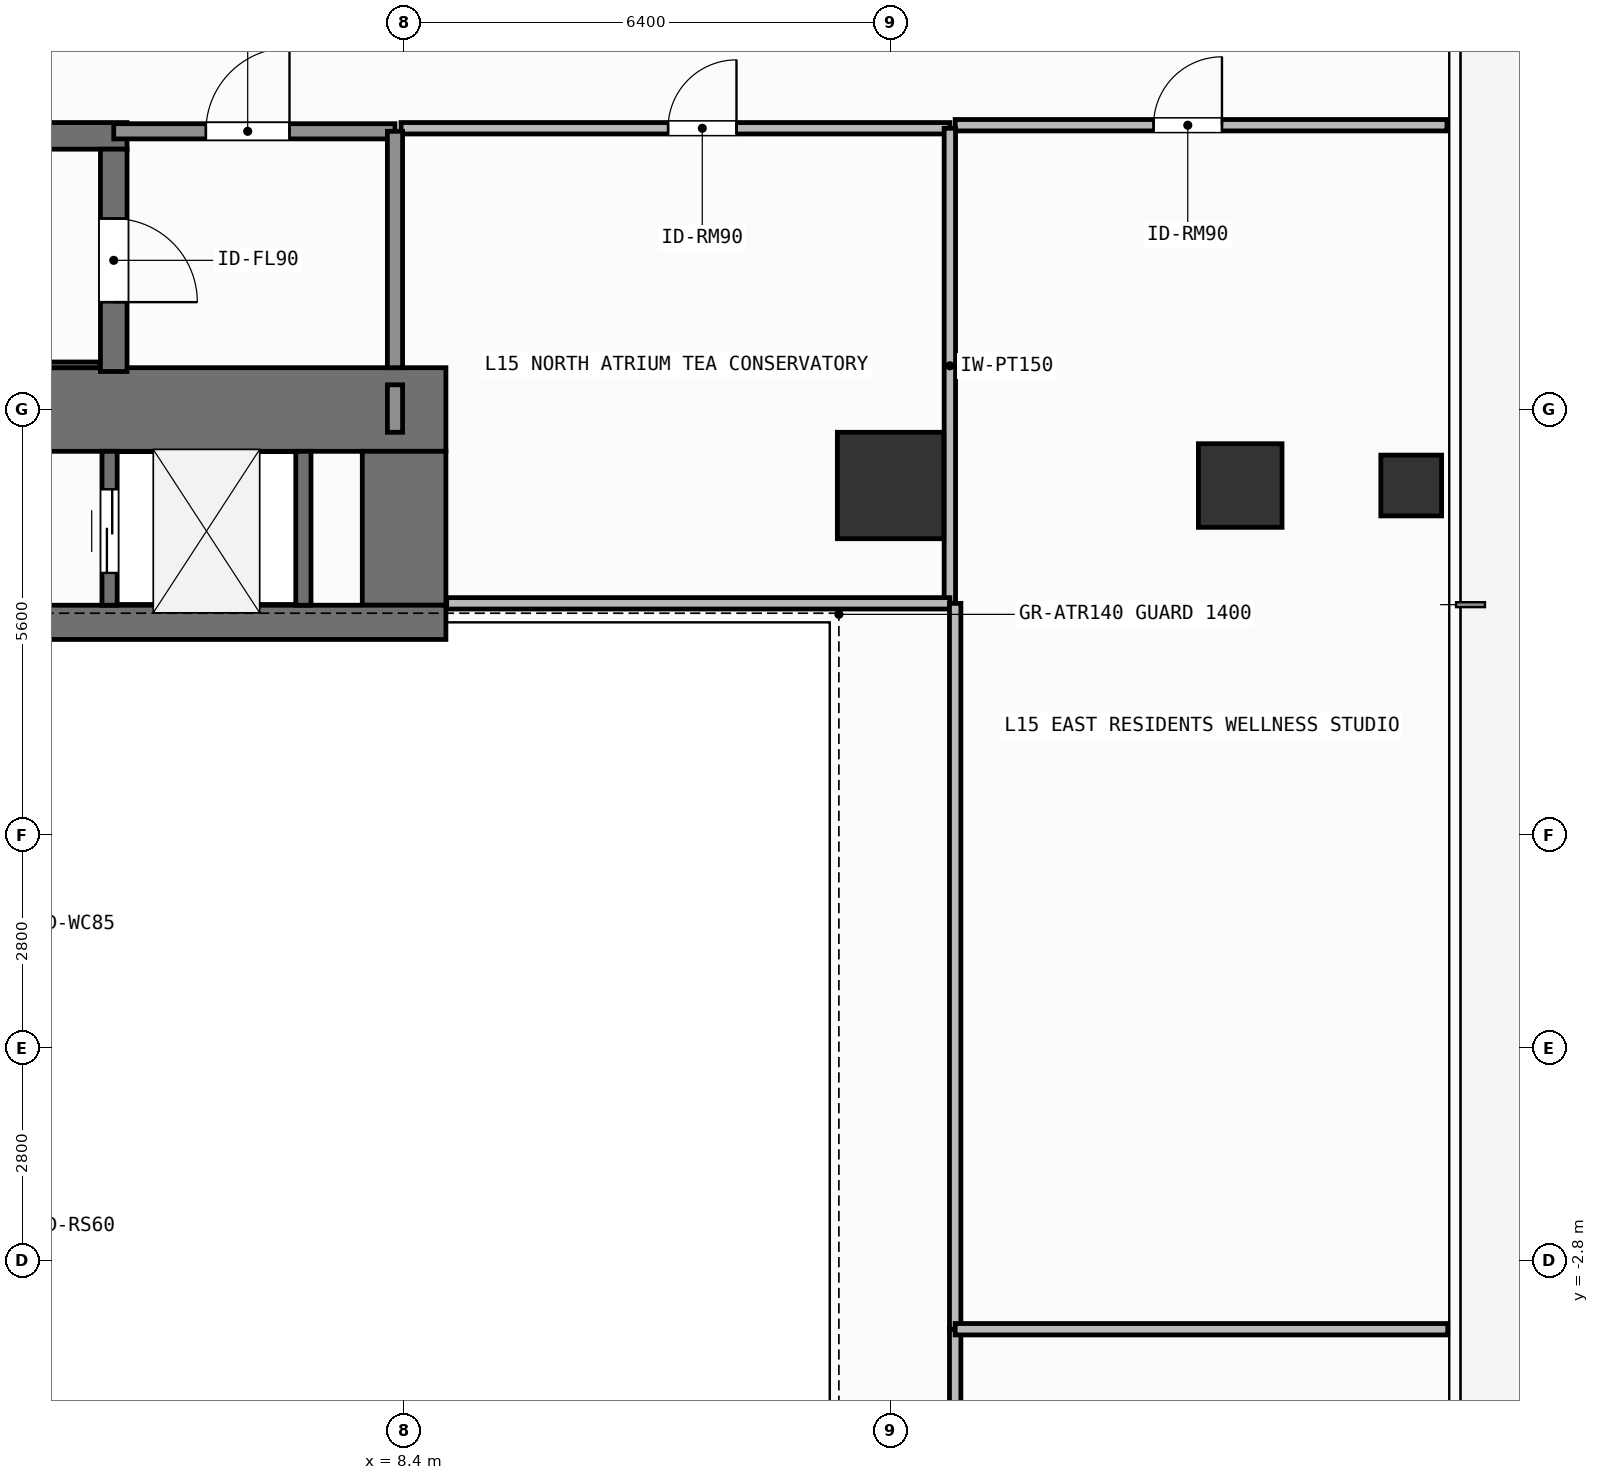
"""IFC4 building model, lengths in metres.
Left out: names, types, materials, properties, quantities, classifications, styles, units other than length and angle.
Written with IfcOpenShell. Run it as: python <this file> out.ifc"""

import sys

from ifc_helpers import new_model, si_unit, direction, frame, frame_2d, origin, origin_2d, place, context, subcontext, project, spatial, rectangle, hollow_rectangle, extrude, element, fill, save


model = new_model("IFC4")
c1 = context("Model", 3, precision=1e-05, world=origin(), true_north=direction((0.0, 1.0)))
c2 = subcontext(c1, "Body", "Model", "MODEL_VIEW")
j1 = project(units=[si_unit("LENGTHUNIT", "METRE"), si_unit("PLANEANGLEUNIT", "RADIAN")], contexts=[c1])
p1 = place(None, origin())
s1 = spatial("IfcSite", under=j1, at=p1, CompositionType="ELEMENT")
p2 = place(p1, origin())
s2 = spatial("IfcBuilding", under=s1, at=p2, CompositionType="ELEMENT")
p3 = place(p2, frame((0.0, 0.0, 57.9)))
s3 = spatial("IfcBuildingStorey", under=s2, at=p3, CompositionType="ELEMENT", Elevation=57.9)
p4 = place(p3, frame((-7.55, 8.4, 0.0), z_axis=(0.0, 0.0, 1.0), x_axis=(1.0, 0.0, 0.0)))
e1 = element("IfcWall", 1, at=p4, inside=s3, PredefinedType="SHEAR", context=c2, shape_type="SweptSolid", body=[
    extrude(rectangle(XDim=16.5, YDim=1.1, at=frame_2d((8.25, 0.0))), origin(), (0.0, 0.0, 1.0), 3.9),
])
p5 = place(p3, frame((8.4, 5.825, 0.0), z_axis=(0.0, 0.0, 1.0), x_axis=(0.0, 1.0, 0.0)))
e2 = element("IfcWall", 2, at=p5, inside=s3, PredefinedType="SHEAR", context=c2, shape_type="SweptSolid", body=[
    extrude(rectangle(XDim=2.025, YDim=1.1, at=frame_2d((1.013, 0.0))), origin(), (0.0, 0.0, 1.0), 3.9),
])
p6 = place(p3, frame((3.045, 5.6, 0.0), z_axis=(0.0, 0.0, 1.0), x_axis=(1.0, 0.0, 0.0)))
e3 = element("IfcWall", 3, at=p6, inside=s3, PredefinedType="SHEAR", context=c2, shape_type="SweptSolid", body=[
    extrude(rectangle(XDim=5.905, YDim=0.45, at=frame_2d((2.953, 0.0))), origin(), (0.0, 0.0, 1.0), 3.9),
])
p7 = place(p3, frame((-2.555, 12.0, 0.0), z_axis=(0.0, 0.0, 1.0), x_axis=(1.0, 0.0, 0.0)))
e4 = element("IfcWall", 4, at=p7, inside=s3, PredefinedType="SHEAR", context=c2, shape_type="SweptSolid", body=[
    extrude(rectangle(XDim=7.31, YDim=0.35, at=frame_2d((3.655, 0.0))), origin(), (0.0, 0.0, 1.0), 3.9),
])
p8 = place(p3, frame((-2.2, 8.988, 0.0), z_axis=(0.0, 0.0, 1.0), x_axis=(1.0, 0.0, 0.0)))
e5 = element("IfcWall", 5, at=p8, inside=s3, PredefinedType="SHEAR", context=c2, shape_type="SweptSolid", body=[
    extrude(rectangle(XDim=6.6, YDim=0.075, at=frame_2d((3.3, 0.0))), origin(), (0.0, 0.0, 1.0), 3.9),
])
p9 = place(p3, frame((4.58, 11.825, 0.0), z_axis=(0.0, 0.0, 1.0), x_axis=(0.0, -1.0, 0.0)))
e6 = element("IfcWall", 6, at=p9, inside=s3, PredefinedType="SHEAR", context=c2, shape_type="SweptSolid", body=[
    extrude(rectangle(XDim=2.925, YDim=0.35, at=frame_2d((1.462, 0.0))), origin(), (0.0, 0.0, 1.0), 3.9),
])
p10 = place(p9, frame((0.913, 0.0, 0.0)))
e7 = element("IfcOpeningElement", 7, at=p10, cuts=e6, PredefinedType="OPENING", context=c2, shape_type="SweptSolid", body=[
    extrude(rectangle(XDim=1.1, YDim=2.15, at=frame_2d((0.55, 1.075))), frame((0.0, 0.185, 0.0), z_axis=(0.0, -1.0, 0.0), x_axis=(1.0, 0.0, 0.0)), (0.0, 0.0, 1.0), 0.37),
])
p11 = place(p3, frame((14.8, 7.4, 0.0), z_axis=(0.0, 0.0, 1.0), x_axis=(1.0, 0.0, 0.0)))
e8 = element("IfcColumn", 8, at=p11, inside=s3, PredefinedType="COLUMN", context=c2, shape_type="SweptSolid", body=[
    extrude(rectangle(XDim=1.4, YDim=1.4, at=origin_2d()), origin(), (0.0, 0.0, 1.0), 3.9),
])
p12 = place(p3, frame((19.4, 7.4, 0.0), z_axis=(0.0, 0.0, 1.0), x_axis=(1.0, 0.0, 0.0)))
e9 = element("IfcColumn", 9, at=p12, inside=s3, PredefinedType="COLUMN", context=c2, shape_type="SweptSolid", body=[
    extrude(rectangle(XDim=1.1, YDim=1.1, at=origin_2d()), origin(), (0.0, 0.0, 1.0), 3.9),
])
p13 = place(p3, frame((21.65, 7.4, 0.0), z_axis=(0.0, 0.0, 1.0), x_axis=(1.0, 0.0, 0.0)))
e10 = element("IfcColumn", 10, at=p13, inside=s3, PredefinedType="COLUMN", context=c2, shape_type="SweptSolid", body=[
    extrude(hollow_rectangle(XDim=0.8, YDim=0.8, WallThickness=0.036, at=origin_2d()), origin(), (0.0, 0.0, 1.0), 3.9),
])
p14 = place(p3, frame((4.525, 5.825, 0.0), z_axis=(0.0, 0.0, 1.0), x_axis=(0.0, 1.0, 0.0)))
e11 = element("IfcWall", 11, at=p14, inside=s3, PredefinedType="SHEAR", context=c2, shape_type="SweptSolid", body=[
    extrude(rectangle(XDim=2.025, YDim=0.2, at=frame_2d((1.013, 0.0))), origin(), (0.0, 0.0, 1.0), 3.68),
])
p15 = place(p14, frame((0.425, 0.0, 0.0)))
e12 = element("IfcOpeningElement", 12, at=p15, cuts=e11, PredefinedType="OPENING", context=c2, shape_type="SweptSolid", body=[
    extrude(rectangle(XDim=1.1, YDim=2.2, at=frame_2d((0.55, 1.1))), frame((0.0, 0.11, 0.0), z_axis=(0.0, -1.0, 0.0), x_axis=(1.0, 0.0, 0.0)), (0.0, 0.0, 1.0), 0.22),
])
p16 = place(p3, frame((7.075, 5.825, 0.0), z_axis=(0.0, 0.0, 1.0), x_axis=(0.0, 1.0, 0.0)))
e13 = element("IfcWall", 13, at=p16, inside=s3, PredefinedType="SHEAR", context=c2, shape_type="SweptSolid", body=[
    extrude(rectangle(XDim=2.025, YDim=0.2, at=frame_2d((1.013, 0.0))), origin(), (0.0, 0.0, 1.0), 3.68),
])
p17 = place(p3, frame((4.58, 12.06, 0.0), z_axis=(0.0, 0.0, 1.0), x_axis=(1.0, 0.0, 0.0)))
e14 = element("IfcWall", 14, at=p17, inside=s3, PredefinedType="SOLIDWALL", context=c2, shape_type="SweptSolid", body=[
    extrude(rectangle(XDim=3.7, YDim=0.2, at=frame_2d((1.85, 0.0))), origin(), (0.0, 0.0, 1.0), 3.68),
])
p18 = place(p17, frame((1.212, 0.0, 0.0)))
e15 = element("IfcOpeningElement", 15, at=p18, cuts=e14, PredefinedType="OPENING", context=c2, shape_type="SweptSolid", body=[
    extrude(rectangle(XDim=1.1, YDim=2.15, at=frame_2d((0.55, 1.075))), frame((0.0, 0.11, 0.0), z_axis=(0.0, -1.0, 0.0), x_axis=(1.0, 0.0, 0.0)), (0.0, 0.0, 1.0), 0.22),
])
p19 = place(p3, frame((8.36, 12.1, 0.0), z_axis=(0.0, 0.0, 1.0), x_axis=(1.0, 0.0, 0.0)))
e16 = element("IfcWall", 16, at=p19, inside=s3, PredefinedType="PARTITIONING", context=c2, shape_type="SweptSolid", body=[
    extrude(rectangle(XDim=7.22, YDim=0.15, at=frame_2d((3.61, 0.0))), origin(), (0.0, 0.0, 1.0), 3.68),
])
p20 = place(p19, frame((3.513, 0.0, 0.0)))
e17 = element("IfcOpeningElement", 17, at=p20, cuts=e16, PredefinedType="OPENING", context=c2, shape_type="SweptSolid", body=[
    extrude(rectangle(XDim=0.9, YDim=2.1, at=frame_2d((0.45, 1.05))), frame((0.0, 0.085, 0.0), z_axis=(0.0, -1.0, 0.0), x_axis=(1.0, 0.0, 0.0)), (0.0, 0.0, 1.0), 0.17),
])
p21 = place(p3, frame((15.65, 12.14, 0.0), z_axis=(0.0, 0.0, 1.0), x_axis=(1.0, 0.0, 0.0)))
e18 = element("IfcWall", 18, at=p21, inside=s3, PredefinedType="PARTITIONING", context=c2, shape_type="SweptSolid", body=[
    extrude(rectangle(XDim=6.47, YDim=0.15, at=frame_2d((3.235, 0.0))), origin(), (0.0, 0.0, 1.0), 3.68),
])
p22 = place(p21, frame((2.61, 0.0, 0.0)))
e19 = element("IfcOpeningElement", 19, at=p22, cuts=e18, PredefinedType="OPENING", context=c2, shape_type="SweptSolid", body=[
    extrude(rectangle(XDim=0.9, YDim=2.1, at=frame_2d((0.45, 1.05))), frame((0.0, 0.085, 0.0), z_axis=(0.0, -1.0, 0.0), x_axis=(1.0, 0.0, 0.0)), (0.0, 0.0, 1.0), 0.17),
])
p23 = place(p3, frame((8.28, 8.95, 0.0), z_axis=(0.0, 0.0, 1.0), x_axis=(0.0, 1.0, 0.0)))
e20 = element("IfcWall", 20, at=p23, inside=s3, PredefinedType="SOLIDWALL", context=c2, shape_type="SweptSolid", body=[
    extrude(rectangle(XDim=3.11, YDim=0.2, at=frame_2d((1.555, 0.0))), origin(), (0.0, 0.0, 1.0), 3.68),
])
p24 = place(p3, frame((8.28, 8.1, 0.0), z_axis=(0.0, 0.0, 1.0), x_axis=(0.0, 1.0, 0.0)))
e21 = element("IfcWall", 21, at=p24, inside=s3, PredefinedType="SOLIDWALL", context=c2, shape_type="SweptSolid", body=[
    extrude(rectangle(XDim=0.625, YDim=0.2, at=frame_2d((0.312, 0.0))), origin(), (0.0, 0.0, 1.0), 3.68),
])
p25 = place(p3, frame((15.58, 5.85, 0.0), z_axis=(0.0, 0.0, 1.0), x_axis=(0.0, 1.0, 0.0)))
e22 = element("IfcWall", 22, at=p25, inside=s3, PredefinedType="PARTITIONING", context=c2, shape_type="SweptSolid", body=[
    extrude(rectangle(XDim=6.25, YDim=0.15, at=frame_2d((3.125, 0.0))), origin(), (0.0, 0.0, 1.0), 3.68),
])
p26 = place(p3, frame((8.96, 5.85, 0.0), z_axis=(0.0, 0.0, 1.0), x_axis=(1.0, 0.0, 0.0)))
e23 = element("IfcWall", 23, at=p26, inside=s3, PredefinedType="PARTITIONING", context=c2, shape_type="SweptSolid", body=[
    extrude(rectangle(XDim=6.62, YDim=0.15, at=frame_2d((3.31, 0.0))), origin(), (0.0, 0.0, 1.0), 3.68),
])
p27 = place(p3, frame((15.65, -5.85, 0.0), z_axis=(0.0, 0.0, 1.0), x_axis=(0.0, 1.0, 0.0)))
e24 = element("IfcWall", 24, at=p27, inside=s3, PredefinedType="PARTITIONING", context=c2, shape_type="SweptSolid", body=[
    extrude(rectangle(XDim=2.15, YDim=0.15, at=frame_2d((1.075, 0.0))), origin(), (0.0, 0.0, 1.0), 3.68),
])
p28 = place(p3, frame((15.65, -3.7, 0.0), z_axis=(0.0, 0.0, 1.0), x_axis=(0.0, 1.0, 0.0)))
e25 = element("IfcWall", 25, at=p28, inside=s3, PredefinedType="PARTITIONING", context=c2, shape_type="SweptSolid", body=[
    extrude(rectangle(XDim=9.55, YDim=0.15, at=frame_2d((4.775, 0.0))), origin(), (0.0, 0.0, 1.0), 3.68),
])
p29 = place(p3, frame((15.65, -3.7, 0.0), z_axis=(0.0, 0.0, 1.0), x_axis=(1.0, 0.0, 0.0)))
e26 = element("IfcWall", 26, at=p29, inside=s3, PredefinedType="PARTITIONING", context=c2, shape_type="SweptSolid", body=[
    extrude(rectangle(XDim=6.48, YDim=0.15, at=frame_2d((3.24, 0.0))), origin(), (0.0, 0.0, 1.0), 3.68),
])
p30 = place(p15, origin())
e27 = element("IfcDoor", 27, at=p30, inside=s3, OperationType="SLIDING_TO_LEFT", PredefinedType="DOOR", context=c2, shape_type="SweptSolid", body=[
    extrude(rectangle(XDim=1.1, YDim=2.2, at=frame_2d((0.55, 1.1))), frame((0.0, 0.025, 0.0), z_axis=(0.0, -1.0, 0.0), x_axis=(1.0, 0.0, 0.0)), (0.0, 0.0, 1.0), 0.05),
])
fill(e12, e27)
p31 = place(p10, origin())
e28 = element("IfcDoor", 28, at=p31, inside=s3, OperationType="SINGLE_SWING_RIGHT", PredefinedType="DOOR", context=c2, shape_type="SweptSolid", body=[
    extrude(rectangle(XDim=1.1, YDim=2.15, at=frame_2d((0.55, 1.075))), frame((0.0, 0.025, 0.0), z_axis=(0.0, -1.0, 0.0), x_axis=(1.0, 0.0, 0.0)), (0.0, 0.0, 1.0), 0.05),
])
fill(e7, e28)
p32 = place(p18, origin())
e29 = element("IfcDoor", 29, at=p32, inside=s3, OperationType="SINGLE_SWING_RIGHT", PredefinedType="DOOR", context=c2, shape_type="SweptSolid", body=[
    extrude(rectangle(XDim=1.1, YDim=2.15, at=frame_2d((0.55, 1.075))), frame((0.0, 0.025, 0.0), z_axis=(0.0, -1.0, 0.0), x_axis=(1.0, 0.0, 0.0)), (0.0, 0.0, 1.0), 0.05),
])
fill(e15, e29)
p33 = place(p20, origin())
e30 = element("IfcDoor", 30, at=p33, inside=s3, OperationType="SINGLE_SWING_RIGHT", PredefinedType="DOOR", context=c2, shape_type="SweptSolid", body=[
    extrude(rectangle(XDim=0.9, YDim=2.1, at=frame_2d((0.45, 1.05))), frame((0.0, 0.025, 0.0), z_axis=(0.0, -1.0, 0.0), x_axis=(1.0, 0.0, 0.0)), (0.0, 0.0, 1.0), 0.05),
])
fill(e17, e30)
p34 = place(p22, origin())
e31 = element("IfcDoor", 31, at=p34, inside=s3, OperationType="SINGLE_SWING_RIGHT", PredefinedType="DOOR", context=c2, shape_type="SweptSolid", body=[
    extrude(rectangle(XDim=0.9, YDim=2.1, at=frame_2d((0.45, 1.05))), frame((0.0, 0.025, 0.0), z_axis=(0.0, -1.0, 0.0), x_axis=(1.0, 0.0, 0.0)), (0.0, 0.0, 1.0), 0.05),
])
fill(e19, e31)
save(model, sys.argv[1])
